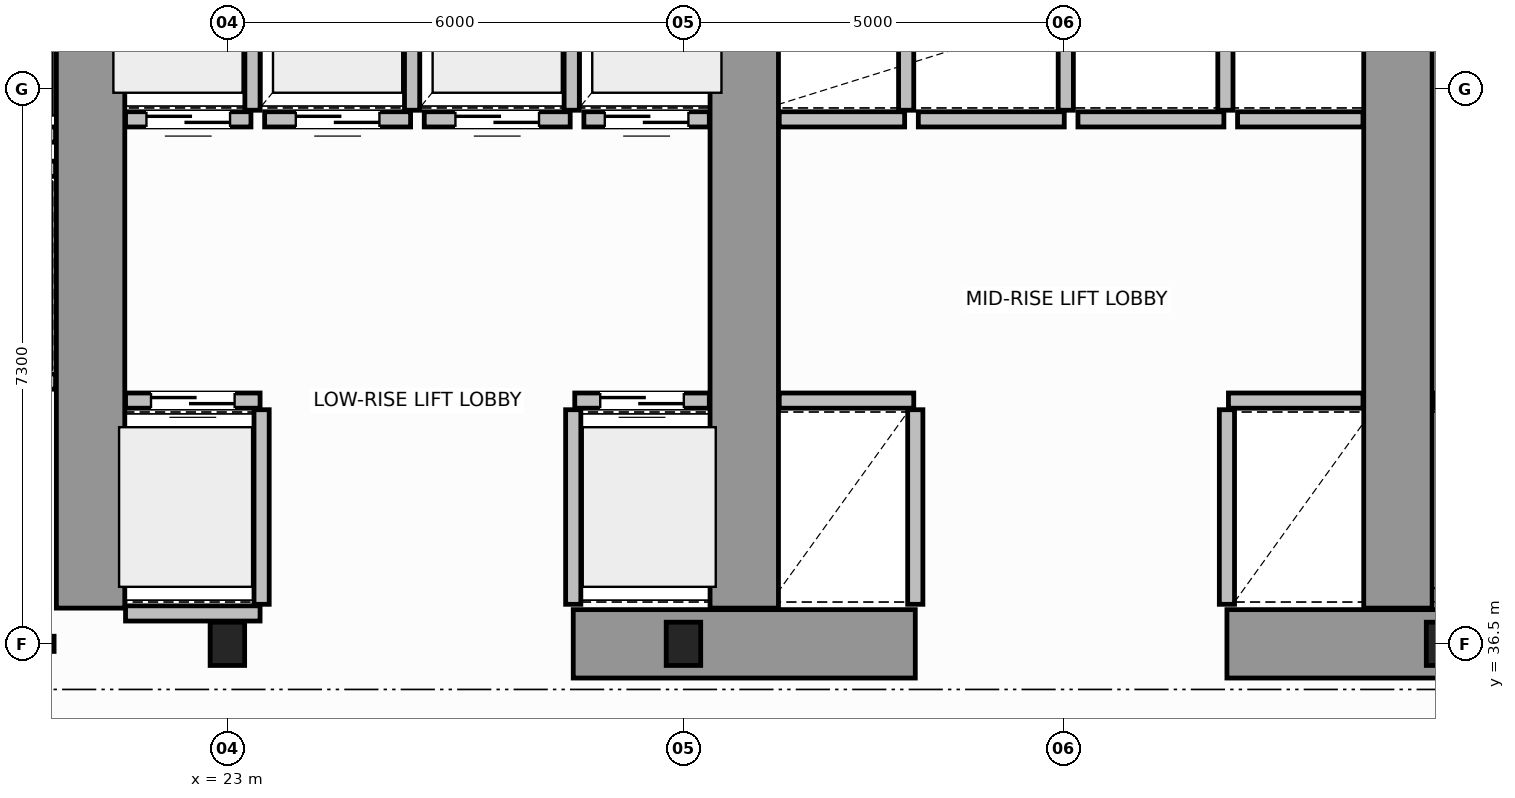
"""IFC4 building model, lengths in metres.
Left out: names, types, materials, properties, quantities, classifications, styles, units other than length and angle.
Written with IfcOpenShell. Run it as: python <this file> out.ifc"""

import sys

from ifc_helpers import new_model, si_unit, direction, frame, frame_2d, origin, origin_2d, place, context, subcontext, project, spatial, rectangle, i_section, extrude, source, transform, mapped, element, fill, save


model = new_model("IFC4")
c1 = context("Model", 3, precision=1e-05, world=origin(), true_north=direction((0.0, 1.0)))
c2 = subcontext(c1, "Body", "Model", "MODEL_VIEW")
j1 = project(units=[si_unit("LENGTHUNIT", "METRE"), si_unit("PLANEANGLEUNIT", "RADIAN")], contexts=[c1])
p1 = place(None, origin())
s1 = spatial("IfcSite", under=j1, at=p1, CompositionType="ELEMENT")
p2 = place(p1, origin())
s2 = spatial("IfcBuilding", under=s1, at=p2, CompositionType="ELEMENT")
p3 = place(p2, frame((0.0, 0.0, 22.6)))
s3 = spatial("IfcBuildingStorey", under=s2, at=p3, CompositionType="ELEMENT", Elevation=22.6)
m1 = source(origin(), c2, "Body", "SweptSolid", [
    extrude(i_section(OverallWidth=0.454, OverallDepth=0.569, WebThickness=0.078, FlangeThickness=0.08, FilletRadius=0.015, at=origin_2d()), origin(), (0.0, 0.0, 1.0), 3.8),
])
for number, where, z_axis, x_axis in (
    (1, (23.0, 36.5, 0.0), (0.0, 0.0, 1.0), (1.0, 0.0, 0.0)),
    (2, (29.0, 36.5, 0.0), (0.0, 0.0, 1.0), (1.0, 0.0, 0.0)),
    (3, (39.0, 36.5, 0.0), (0.0, 0.0, 1.0), (1.0, 0.0, 0.0)),
):
    element("IfcColumn", number, at=place(p3, frame(where, z_axis=z_axis, x_axis=x_axis)), inside=s3, PredefinedType="COLUMN", context=c2, shape_type="MappedRepresentation", body=[
        mapped(m1, transform((0.0, 0.0, 0.0), scale=1.0)),
    ])
for number, where, z_axis, x_axis in (
    (4, (27.55, 36.5, 0.0), (0.0, 0.0, 1.0), (1.0, 0.0, 0.0)),
    (5, (36.15, 36.5, 0.0), (0.0, 0.0, 1.0), (1.0, 0.0, 0.0)),
):
    element("IfcWall", number, at=place(p3, frame(where, z_axis=z_axis, x_axis=x_axis)), inside=s3, PredefinedType="SHEAR", context=c2, shape_type="SweptSolid", body=[
        extrude(rectangle(XDim=4.5, YDim=0.9, at=frame_2d((2.25, 0.0))), origin(), (0.0, 0.0, 1.0), 3.8),
    ])
for number, where, z_axis, x_axis in (
    (6, (21.2, 36.97, 0.0), (0.0, 0.0, 1.0), (0.0, 1.0, 0.0)),
    (7, (29.8, 36.97, 0.0), (0.0, 0.0, 1.0), (0.0, 1.0, 0.0)),
    (8, (38.4, 36.97, 0.0), (0.0, 0.0, 1.0), (0.0, 1.0, 0.0)),
):
    element("IfcWall", number, at=place(p3, frame(where, z_axis=z_axis, x_axis=x_axis)), inside=s3, PredefinedType="SHEAR", context=c2, shape_type="SweptSolid", body=[
        extrude(rectangle(XDim=9.23, YDim=0.9, at=frame_2d((4.615, 0.0))), origin(), (0.0, 0.0, 1.0), 3.8),
    ])
p4 = place(p3, frame((18.25, 36.5, 0.0), z_axis=(0.0, 0.0, 1.0), x_axis=(1.0, 0.0, 0.0)))
e9 = element("IfcWall", 9, at=p4, inside=s3, PredefinedType="SOLIDWALL", context=c2, shape_type="SweptSolid", body=[
    extrude(rectangle(XDim=2.47, YDim=0.2, at=frame_2d((1.235, 0.0))), origin(), (0.0, 0.0, 1.0), 2.37),
])
p5 = place(p4, frame((0.65, 0.0, 0.0)))
e10 = element("IfcOpeningElement", 10, at=p5, cuts=e9, PredefinedType="OPENING", context=c2, shape_type="SweptSolid", body=[
    extrude(rectangle(XDim=1.1, YDim=2.15, at=frame_2d((0.55, 1.075))), frame((0.0, 0.11, 0.0), z_axis=(0.0, -1.0, 0.0), x_axis=(1.0, 0.0, 0.0)), (0.0, 0.0, 1.0), 0.22),
])
p6 = place(p3, frame((21.66, 39.7, 0.0), z_axis=(0.0, 0.0, 1.0), x_axis=(1.0, 0.0, 0.0)))
e11 = element("IfcWall", 11, at=p6, inside=s3, PredefinedType="SOLIDWALL", context=c2, shape_type="SweptSolid", body=[
    extrude(rectangle(XDim=1.77, YDim=0.2, at=frame_2d((0.885, 0.0))), origin(), (0.0, 0.0, 1.0), 3.58),
])
p7 = place(p6, frame((0.335, 0.0, 0.0)))
e12 = element("IfcOpeningElement", 12, at=p7, cuts=e11, PredefinedType="OPENING", context=c2, shape_type="SweptSolid", body=[
    extrude(rectangle(XDim=1.1, YDim=2.15, at=frame_2d((0.55, 1.075))), frame((0.0, 0.11, 0.0), z_axis=(0.0, -1.0, 0.0), x_axis=(1.0, 0.0, 0.0)), (0.0, 0.0, 1.0), 0.22),
])
p8 = place(p3, frame((21.66, 36.9, 0.0), z_axis=(0.0, 0.0, 1.0), x_axis=(1.0, 0.0, 0.0)))
e13 = element("IfcWall", 13, at=p8, inside=s3, PredefinedType="SOLIDWALL", context=c2, shape_type="SweptSolid", body=[
    extrude(rectangle(XDim=1.77, YDim=0.2, at=frame_2d((0.885, 0.0))), origin(), (0.0, 0.0, 1.0), 2.37),
])
p9 = place(p3, frame((23.45, 37.02, 0.0), z_axis=(0.0, 0.0, 1.0), x_axis=(0.0, 1.0, 0.0)))
e14 = element("IfcWall", 14, at=p9, inside=s3, PredefinedType="SOLIDWALL", context=c2, shape_type="SweptSolid", body=[
    extrude(rectangle(XDim=2.56, YDim=0.2, at=frame_2d((1.28, 0.0))), origin(), (0.0, 0.0, 1.0), 3.58),
])
p10 = place(p3, frame((27.57, 39.7, 0.0), z_axis=(0.0, 0.0, 1.0), x_axis=(1.0, 0.0, 0.0)))
e15 = element("IfcWall", 15, at=p10, inside=s3, PredefinedType="SOLIDWALL", context=c2, shape_type="SweptSolid", body=[
    extrude(rectangle(XDim=1.77, YDim=0.2, at=frame_2d((0.885, 0.0))), origin(), (0.0, 0.0, 1.0), 3.58),
])
p11 = place(p10, frame((0.335, 0.0, 0.0)))
e16 = element("IfcOpeningElement", 16, at=p11, cuts=e15, PredefinedType="OPENING", context=c2, shape_type="SweptSolid", body=[
    extrude(rectangle(XDim=1.1, YDim=2.15, at=frame_2d((0.55, 1.075))), frame((0.0, 0.11, 0.0), z_axis=(0.0, -1.0, 0.0), x_axis=(1.0, 0.0, 0.0)), (0.0, 0.0, 1.0), 0.22),
])
p12 = place(p3, frame((27.55, 37.02, 0.0), z_axis=(0.0, 0.0, 1.0), x_axis=(0.0, 1.0, 0.0)))
e17 = element("IfcWall", 17, at=p12, inside=s3, PredefinedType="SOLIDWALL", context=c2, shape_type="SweptSolid", body=[
    extrude(rectangle(XDim=2.56, YDim=0.2, at=frame_2d((1.28, 0.0))), origin(), (0.0, 0.0, 1.0), 3.58),
])
p13 = place(p3, frame((21.66, 43.4, 0.0), z_axis=(0.0, 0.0, 1.0), x_axis=(1.0, 0.0, 0.0)))
e18 = element("IfcWall", 18, at=p13, inside=s3, PredefinedType="SOLIDWALL", context=c2, shape_type="SweptSolid", body=[
    extrude(rectangle(XDim=1.65, YDim=0.2, at=frame_2d((0.825, 0.0))), origin(), (0.0, 0.0, 1.0), 3.58),
])
p14 = place(p13, frame((0.275, 0.0, 0.0)))
e19 = element("IfcOpeningElement", 19, at=p14, cuts=e18, PredefinedType="OPENING", context=c2, shape_type="SweptSolid", body=[
    extrude(rectangle(XDim=1.1, YDim=2.15, at=frame_2d((0.55, 1.075))), frame((0.0, 0.11, 0.0), z_axis=(0.0, -1.0, 0.0), x_axis=(1.0, 0.0, 0.0)), (0.0, 0.0, 1.0), 0.22),
])
p15 = place(p3, frame((23.33, 43.52, 0.0), z_axis=(0.0, 0.0, 1.0), x_axis=(0.0, 1.0, 0.0)))
e20 = element("IfcWall", 20, at=p15, inside=s3, PredefinedType="SOLIDWALL", context=c2, shape_type="SweptSolid", body=[
    extrude(rectangle(XDim=2.56, YDim=0.2, at=frame_2d((1.28, 0.0))), origin(), (0.0, 0.0, 1.0), 3.58),
])
p16 = place(p3, frame((23.49, 43.4, 0.0), z_axis=(0.0, 0.0, 1.0), x_axis=(1.0, 0.0, 0.0)))
e21 = element("IfcWall", 21, at=p16, inside=s3, PredefinedType="SOLIDWALL", context=c2, shape_type="SweptSolid", body=[
    extrude(rectangle(XDim=1.92, YDim=0.2, at=frame_2d((0.96, 0.0))), origin(), (0.0, 0.0, 1.0), 3.58),
])
p17 = place(p16, frame((0.41, 0.0, 0.0)))
e22 = element("IfcOpeningElement", 22, at=p17, cuts=e21, PredefinedType="OPENING", context=c2, shape_type="SweptSolid", body=[
    extrude(rectangle(XDim=1.1, YDim=2.15, at=frame_2d((0.55, 1.075))), frame((0.0, 0.11, 0.0), z_axis=(0.0, -1.0, 0.0), x_axis=(1.0, 0.0, 0.0)), (0.0, 0.0, 1.0), 0.22),
])
p18 = place(p3, frame((25.43, 43.52, 0.0), z_axis=(0.0, 0.0, 1.0), x_axis=(0.0, 1.0, 0.0)))
e23 = element("IfcWall", 23, at=p18, inside=s3, PredefinedType="SOLIDWALL", context=c2, shape_type="SweptSolid", body=[
    extrude(rectangle(XDim=2.56, YDim=0.2, at=frame_2d((1.28, 0.0))), origin(), (0.0, 0.0, 1.0), 3.58),
])
p19 = place(p3, frame((25.59, 43.4, 0.0), z_axis=(0.0, 0.0, 1.0), x_axis=(1.0, 0.0, 0.0)))
e24 = element("IfcWall", 24, at=p19, inside=s3, PredefinedType="SOLIDWALL", context=c2, shape_type="SweptSolid", body=[
    extrude(rectangle(XDim=1.92, YDim=0.2, at=frame_2d((0.96, 0.0))), origin(), (0.0, 0.0, 1.0), 3.58),
])
p20 = place(p19, frame((0.41, 0.0, 0.0)))
e25 = element("IfcOpeningElement", 25, at=p20, cuts=e24, PredefinedType="OPENING", context=c2, shape_type="SweptSolid", body=[
    extrude(rectangle(XDim=1.1, YDim=2.15, at=frame_2d((0.55, 1.075))), frame((0.0, 0.11, 0.0), z_axis=(0.0, -1.0, 0.0), x_axis=(1.0, 0.0, 0.0)), (0.0, 0.0, 1.0), 0.22),
])
p21 = place(p3, frame((27.53, 43.52, 0.0), z_axis=(0.0, 0.0, 1.0), x_axis=(0.0, 1.0, 0.0)))
e26 = element("IfcWall", 26, at=p21, inside=s3, PredefinedType="SOLIDWALL", context=c2, shape_type="SweptSolid", body=[
    extrude(rectangle(XDim=2.56, YDim=0.2, at=frame_2d((1.28, 0.0))), origin(), (0.0, 0.0, 1.0), 3.58),
])
p22 = place(p3, frame((27.69, 43.4, 0.0), z_axis=(0.0, 0.0, 1.0), x_axis=(1.0, 0.0, 0.0)))
e27 = element("IfcWall", 27, at=p22, inside=s3, PredefinedType="SOLIDWALL", context=c2, shape_type="SweptSolid", body=[
    extrude(rectangle(XDim=1.65, YDim=0.2, at=frame_2d((0.825, 0.0))), origin(), (0.0, 0.0, 1.0), 3.58),
])
p23 = place(p22, frame((0.275, 0.0, 0.0)))
e28 = element("IfcOpeningElement", 28, at=p23, cuts=e27, PredefinedType="OPENING", context=c2, shape_type="SweptSolid", body=[
    extrude(rectangle(XDim=1.1, YDim=2.15, at=frame_2d((0.55, 1.075))), frame((0.0, 0.11, 0.0), z_axis=(0.0, -1.0, 0.0), x_axis=(1.0, 0.0, 0.0)), (0.0, 0.0, 1.0), 0.22),
])
p24 = place(p3, frame((30.26, 39.7, 0.0), z_axis=(0.0, 0.0, 1.0), x_axis=(1.0, 0.0, 0.0)))
e29 = element("IfcWall", 29, at=p24, inside=s3, PredefinedType="SOLIDWALL", context=c2, shape_type="SweptSolid", body=[
    extrude(rectangle(XDim=1.77, YDim=0.2, at=frame_2d((0.885, 0.0))), origin(), (0.0, 0.0, 1.0), 3.58),
])
p25 = place(p3, frame((32.05, 37.02, 0.0), z_axis=(0.0, 0.0, 1.0), x_axis=(0.0, 1.0, 0.0)))
e30 = element("IfcWall", 30, at=p25, inside=s3, PredefinedType="SOLIDWALL", context=c2, shape_type="SweptSolid", body=[
    extrude(rectangle(XDim=2.56, YDim=0.2, at=frame_2d((1.28, 0.0))), origin(), (0.0, 0.0, 1.0), 3.58),
])
p26 = place(p3, frame((36.17, 39.7, 0.0), z_axis=(0.0, 0.0, 1.0), x_axis=(1.0, 0.0, 0.0)))
e31 = element("IfcWall", 31, at=p26, inside=s3, PredefinedType="SOLIDWALL", context=c2, shape_type="SweptSolid", body=[
    extrude(rectangle(XDim=1.77, YDim=0.2, at=frame_2d((0.885, 0.0))), origin(), (0.0, 0.0, 1.0), 3.58),
])
p27 = place(p3, frame((36.15, 37.02, 0.0), z_axis=(0.0, 0.0, 1.0), x_axis=(0.0, 1.0, 0.0)))
e32 = element("IfcWall", 32, at=p27, inside=s3, PredefinedType="SOLIDWALL", context=c2, shape_type="SweptSolid", body=[
    extrude(rectangle(XDim=2.56, YDim=0.2, at=frame_2d((1.28, 0.0))), origin(), (0.0, 0.0, 1.0), 3.58),
])
p28 = place(p3, frame((30.26, 43.4, 0.0), z_axis=(0.0, 0.0, 1.0), x_axis=(1.0, 0.0, 0.0)))
e33 = element("IfcWall", 33, at=p28, inside=s3, PredefinedType="SOLIDWALL", context=c2, shape_type="SweptSolid", body=[
    extrude(rectangle(XDim=1.65, YDim=0.2, at=frame_2d((0.825, 0.0))), origin(), (0.0, 0.0, 1.0), 3.58),
])
p29 = place(p3, frame((31.93, 43.52, 0.0), z_axis=(0.0, 0.0, 1.0), x_axis=(0.0, 1.0, 0.0)))
e34 = element("IfcWall", 34, at=p29, inside=s3, PredefinedType="SOLIDWALL", context=c2, shape_type="SweptSolid", body=[
    extrude(rectangle(XDim=2.56, YDim=0.2, at=frame_2d((1.28, 0.0))), origin(), (0.0, 0.0, 1.0), 3.58),
])
p30 = place(p3, frame((32.09, 43.4, 0.0), z_axis=(0.0, 0.0, 1.0), x_axis=(1.0, 0.0, 0.0)))
e35 = element("IfcWall", 35, at=p30, inside=s3, PredefinedType="SOLIDWALL", context=c2, shape_type="SweptSolid", body=[
    extrude(rectangle(XDim=1.92, YDim=0.2, at=frame_2d((0.96, 0.0))), origin(), (0.0, 0.0, 1.0), 3.58),
])
p31 = place(p3, frame((34.03, 43.52, 0.0), z_axis=(0.0, 0.0, 1.0), x_axis=(0.0, 1.0, 0.0)))
e36 = element("IfcWall", 36, at=p31, inside=s3, PredefinedType="SOLIDWALL", context=c2, shape_type="SweptSolid", body=[
    extrude(rectangle(XDim=2.56, YDim=0.2, at=frame_2d((1.28, 0.0))), origin(), (0.0, 0.0, 1.0), 3.58),
])
p32 = place(p3, frame((34.19, 43.4, 0.0), z_axis=(0.0, 0.0, 1.0), x_axis=(1.0, 0.0, 0.0)))
e37 = element("IfcWall", 37, at=p32, inside=s3, PredefinedType="SOLIDWALL", context=c2, shape_type="SweptSolid", body=[
    extrude(rectangle(XDim=1.92, YDim=0.2, at=frame_2d((0.96, 0.0))), origin(), (0.0, 0.0, 1.0), 3.58),
])
p33 = place(p3, frame((36.13, 43.52, 0.0), z_axis=(0.0, 0.0, 1.0), x_axis=(0.0, 1.0, 0.0)))
e38 = element("IfcWall", 38, at=p33, inside=s3, PredefinedType="SOLIDWALL", context=c2, shape_type="SweptSolid", body=[
    extrude(rectangle(XDim=2.56, YDim=0.2, at=frame_2d((1.28, 0.0))), origin(), (0.0, 0.0, 1.0), 3.58),
])
p34 = place(p3, frame((36.29, 43.4, 0.0), z_axis=(0.0, 0.0, 1.0), x_axis=(1.0, 0.0, 0.0)))
e39 = element("IfcWall", 39, at=p34, inside=s3, PredefinedType="SOLIDWALL", context=c2, shape_type="SweptSolid", body=[
    extrude(rectangle(XDim=1.65, YDim=0.2, at=frame_2d((0.825, 0.0))), origin(), (0.0, 0.0, 1.0), 3.58),
])
p35 = place(p3, frame((38.86, 39.7, 0.0), z_axis=(0.0, 0.0, 1.0), x_axis=(1.0, 0.0, 0.0)))
e40 = element("IfcWall", 40, at=p35, inside=s3, PredefinedType="SOLIDWALL", context=c2, shape_type="SweptSolid", body=[
    extrude(rectangle(XDim=1.77, YDim=0.2, at=frame_2d((0.885, 0.0))), origin(), (0.0, 0.0, 1.0), 3.58),
])
p36 = place(p3, frame((18.67, 43.2, 0.0), z_axis=(0.0, 0.0, 1.0), x_axis=(1.0, 0.0, 0.0)))
e41 = element("IfcWall", 41, at=p36, inside=s3, PredefinedType="SOLIDWALL", context=c2, shape_type="SweptSolid", body=[
    extrude(rectangle(XDim=2.07, YDim=0.2, at=frame_2d((1.035, 0.0))), origin(), (0.0, 0.0, 1.0), 3.58),
])
p37 = place(p3, frame((18.67, 39.95, 0.0), z_axis=(0.0, 0.0, 1.0), x_axis=(1.0, 0.0, 0.0)))
e42 = element("IfcWall", 42, at=p37, inside=s3, PredefinedType="SOLIDWALL", context=c2, shape_type="SweptSolid", body=[
    extrude(rectangle(XDim=2.07, YDim=0.2, at=frame_2d((1.035, 0.0))), origin(), (0.0, 0.0, 1.0), 3.58),
])
p38 = place(p37, frame((0.485, 0.0, 0.0)))
e43 = element("IfcOpeningElement", 43, at=p38, cuts=e42, PredefinedType="OPENING", context=c2, shape_type="SweptSolid", body=[
    extrude(rectangle(XDim=1.1, YDim=2.15, at=frame_2d((0.55, 1.075))), frame((0.0, 0.11, 0.0), z_axis=(0.0, -1.0, 0.0), x_axis=(1.0, 0.0, 0.0)), (0.0, 0.0, 1.0), 0.22),
])
p39 = place(p3, frame((18.67, 42.75, 0.0), z_axis=(0.0, 0.0, 1.0), x_axis=(1.0, 0.0, 0.0)))
e44 = element("IfcWall", 44, at=p39, inside=s3, PredefinedType="SOLIDWALL", context=c2, shape_type="SweptSolid", body=[
    extrude(rectangle(XDim=2.07, YDim=0.2, at=frame_2d((1.035, 0.0))), origin(), (0.0, 0.0, 1.0), 3.58),
])
m2 = source(origin(), c2, "Body", "SweptSolid", [
    extrude(rectangle(XDim=1.1, YDim=2.15, at=frame_2d((0.55, 1.075))), frame((0.0, 0.025, 0.0), z_axis=(0.0, -1.0, 0.0), x_axis=(1.0, 0.0, 0.0)), (0.0, 0.0, 1.0), 0.05),
])
p40 = place(p7, origin())
e45 = element("IfcDoor", 45, at=p40, inside=s3, OperationType="DOUBLE_DOOR_SLIDING", PredefinedType="DOOR", context=c2, shape_type="MappedRepresentation", body=[
    mapped(m2, transform((0.0, 0.0, 0.0), scale=1.0)),
])
fill(e12, e45)
p41 = place(p11, origin())
e46 = element("IfcDoor", 46, at=p41, inside=s3, OperationType="DOUBLE_DOOR_SLIDING", PredefinedType="DOOR", context=c2, shape_type="MappedRepresentation", body=[
    mapped(m2, transform((0.0, 0.0, 0.0), scale=1.0)),
])
fill(e16, e46)
p42 = place(p14, origin())
e47 = element("IfcDoor", 47, at=p42, inside=s3, OperationType="DOUBLE_DOOR_SLIDING", PredefinedType="DOOR", context=c2, shape_type="MappedRepresentation", body=[
    mapped(m2, transform((0.0, 0.0, 0.0), scale=1.0)),
])
fill(e19, e47)
p43 = place(p17, origin())
e48 = element("IfcDoor", 48, at=p43, inside=s3, OperationType="DOUBLE_DOOR_SLIDING", PredefinedType="DOOR", context=c2, shape_type="MappedRepresentation", body=[
    mapped(m2, transform((0.0, 0.0, 0.0), scale=1.0)),
])
fill(e22, e48)
p44 = place(p20, origin())
e49 = element("IfcDoor", 49, at=p44, inside=s3, OperationType="DOUBLE_DOOR_SLIDING", PredefinedType="DOOR", context=c2, shape_type="MappedRepresentation", body=[
    mapped(m2, transform((0.0, 0.0, 0.0), scale=1.0)),
])
fill(e25, e49)
p45 = place(p23, origin())
e50 = element("IfcDoor", 50, at=p45, inside=s3, OperationType="DOUBLE_DOOR_SLIDING", PredefinedType="DOOR", context=c2, shape_type="MappedRepresentation", body=[
    mapped(m2, transform((0.0, 0.0, 0.0), scale=1.0)),
])
fill(e28, e50)
save(model, sys.argv[1])
